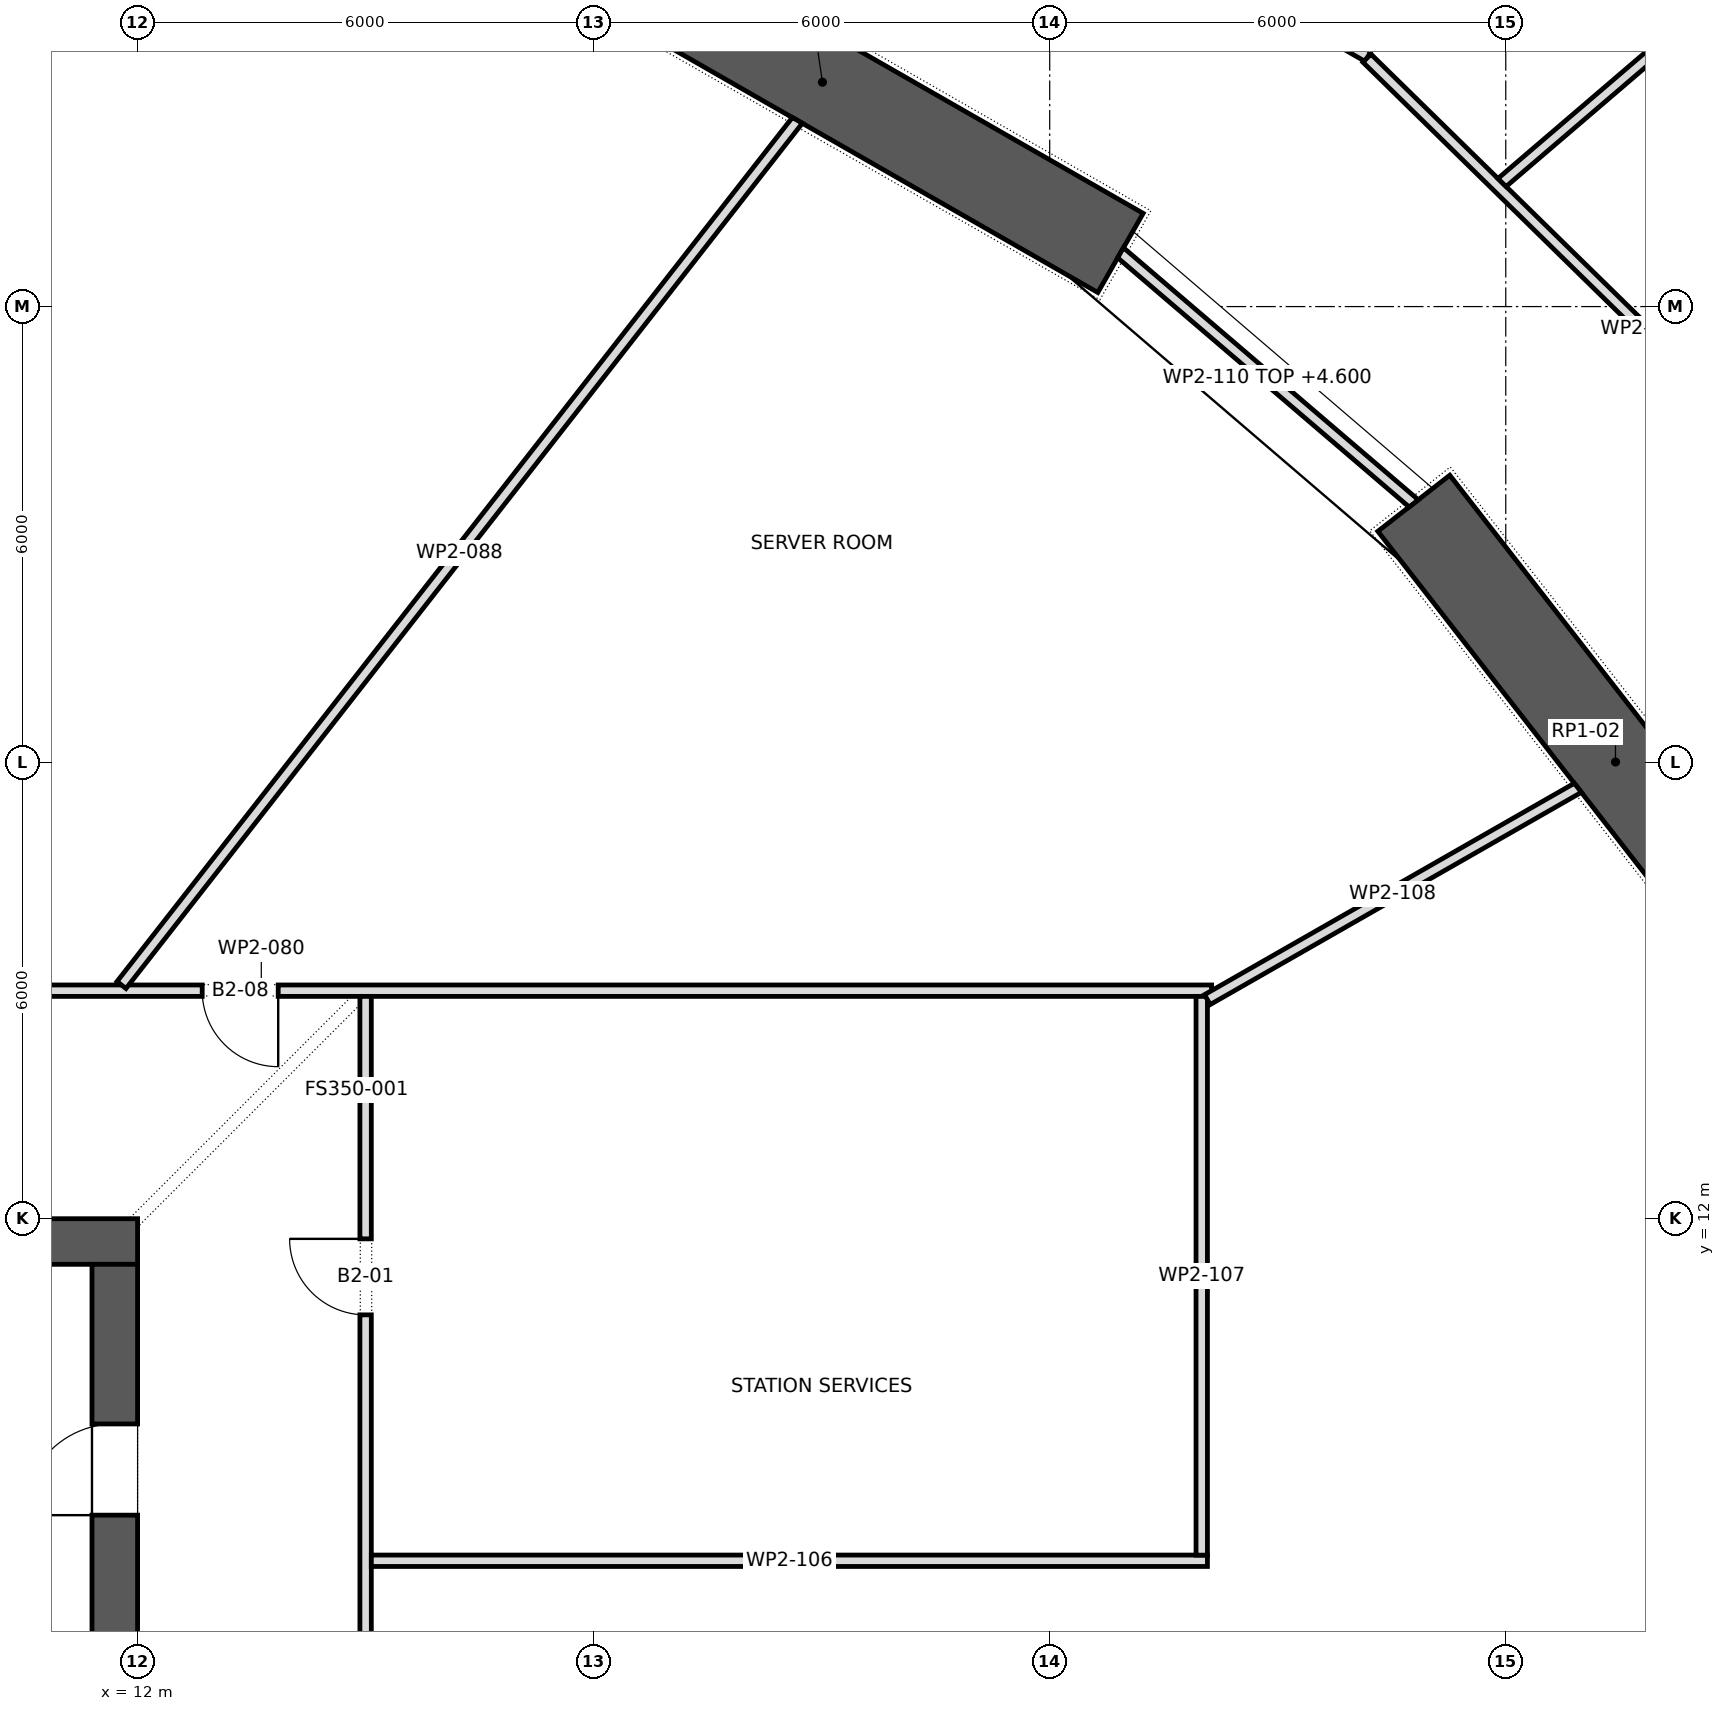
"""IFC4 building model, lengths in metres.
Left out: names, types, materials, properties, quantities, classifications, styles, units other than length and angle.
Written with IfcOpenShell. Run it as: python <this file> out.ifc"""

import sys

from ifc_helpers import new_model, si_unit, direction, frame, frame_2d, origin, place, context, subcontext, project, spatial, polyline, rectangle, outline, extrude, element, fill, save


model = new_model("IFC4")
c1 = context("Model", 3, precision=1e-05, world=origin(), true_north=direction((0.0, 1.0)))
c2 = subcontext(c1, "Body", "Model", "MODEL_VIEW")
j1 = project(units=[si_unit("LENGTHUNIT", "METRE"), si_unit("PLANEANGLEUNIT", "RADIAN")], contexts=[c1])
p1 = place(None, origin())
s1 = spatial("IfcSite", under=j1, at=p1, CompositionType="ELEMENT")
p2 = place(p1, origin())
s2 = spatial("IfcBuilding", under=s1, at=p2, CompositionType="ELEMENT")
p3 = place(p2, frame((0.0, 0.0, -9.5)))
s3 = spatial("IfcBuildingStorey", under=s2, at=p3, CompositionType="ELEMENT", Elevation=-9.5)
p4 = place(p3, frame((34.097, 14.605, 0.0), z_axis=(0.0, 0.0, 1.0), x_axis=(-0.614825322247, 0.788663314174, 0.0)))
e1 = element("IfcWall", 1, at=p4, inside=s3, PredefinedType="SHEAR", context=c2, shape_type="SweptSolid", body=[
    extrude(rectangle(XDim=8.632, YDim=1.2, at=frame_2d((4.316, 0.0))), origin(), (0.0, 0.0, 1.0), 5.5),
])
p5 = place(p3, frame((24.931, 24.706, 0.0), z_axis=(0.0, 0.0, 1.0), x_axis=(-0.867760656864, 0.496982336103, 0.0)))
e2 = element("IfcWall", 2, at=p5, inside=s3, PredefinedType="SHEAR", context=c2, shape_type="SweptSolid", body=[
    extrude(rectangle(XDim=9.038, YDim=1.2, at=frame_2d((4.519, 0.0))), origin(), (0.0, 0.0, 1.0), 5.5),
])
p6 = place(p3, frame((-12.0, 11.7, 0.0), z_axis=(0.0, 0.0, 1.0), x_axis=(1.0, 0.0, 0.0)))
e3 = element("IfcWall", 3, at=p6, inside=s3, PredefinedType="SHEAR", context=c2, shape_type="SweptSolid", body=[
    extrude(rectangle(XDim=24.0, YDim=0.6, at=frame_2d((12.0, 0.0))), origin(), (0.0, 0.0, 1.0), 5.5),
])
p7 = place(p6, frame((11.6, 0.0, 0.0)))
e4 = element("IfcOpeningElement", 4, at=p7, cuts=e3, PredefinedType="OPENING", context=c2, shape_type="SweptSolid", body=[
    extrude(rectangle(XDim=0.8, YDim=2.1, at=frame_2d((0.4, 1.05))), frame((0.0, 0.312, 0.0), z_axis=(0.0, -1.0, 0.0), x_axis=(1.0, 0.0, 0.0)), (0.0, 0.0, 1.0), 0.624),
])
p8 = place(p3, frame((11.7, -11.4, 0.0), z_axis=(0.0, 0.0, 1.0), x_axis=(0.0, 1.0, 0.0)))
e5 = element("IfcWall", 5, at=p8, inside=s3, PredefinedType="SHEAR", context=c2, shape_type="SweptSolid", body=[
    extrude(rectangle(XDim=22.8, YDim=0.6, at=frame_2d((11.4, 0.0))), origin(), (0.0, 0.0, 1.0), 5.5),
])
p9 = place(p8, frame((10.2, 0.0, 0.0)))
e6 = element("IfcOpeningElement", 6, at=p9, cuts=e5, PredefinedType="OPENING", context=c2, shape_type="SweptSolid", body=[
    extrude(rectangle(XDim=2.4, YDim=2.1, at=frame_2d((1.2, 1.05))), frame((0.0, 0.312, 0.0), z_axis=(0.0, -1.0, 0.0), x_axis=(1.0, 0.0, 0.0)), (0.0, 0.0, 1.0), 0.624),
])
p10 = place(p8, frame((19.5, 0.0, 0.0)))
e7 = element("IfcOpeningElement", 7, at=p10, cuts=e5, PredefinedType="OPENING", context=c2, shape_type="SweptSolid", body=[
    extrude(rectangle(XDim=1.2, YDim=2.1, at=frame_2d((0.6, 1.05))), frame((0.0, 0.312, 0.0), z_axis=(0.0, -1.0, 0.0), x_axis=(1.0, 0.0, 0.0)), (0.0, 0.0, 1.0), 0.624),
])
p11 = place(p8, frame((2.1, 0.0, 0.0)))
e8 = element("IfcOpeningElement", 8, at=p11, cuts=e5, PredefinedType="OPENING", context=c2, shape_type="SweptSolid", body=[
    extrude(rectangle(XDim=1.2, YDim=2.1, at=frame_2d((0.6, 1.05))), frame((0.0, 0.312, 0.0), z_axis=(0.0, -1.0, 0.0), x_axis=(1.0, 0.0, 0.0)), (0.0, 0.0, 1.0), 0.624),
])
p12 = place(p3, frame((1.125, 15.0, 0.0), z_axis=(0.0, 0.0, 1.0), x_axis=(1.0, 0.0, 0.0)))
e9 = element("IfcWall", 9, at=p12, inside=s3, PredefinedType="PARTITIONING", context=c2, shape_type="SweptSolid", body=[
    extrude(rectangle(XDim=25.005, YDim=0.15, at=frame_2d((12.502, 0.0))), origin(), (0.0, 0.0, 1.0), 5.05),
])
p13 = place(p12, frame((11.725, 0.0, 0.0)))
e10 = element("IfcOpeningElement", 10, at=p13, cuts=e9, PredefinedType="OPENING", context=c2, shape_type="SweptSolid", body=[
    extrude(rectangle(XDim=1.0, YDim=2.1, at=frame_2d((0.5, 1.05))), frame((0.0, 0.087, 0.0), z_axis=(0.0, -1.0, 0.0), x_axis=(1.0, 0.0, 0.0)), (0.0, 0.0, 1.0), 0.174),
])
p14 = place(p12, frame((4.444, 0.0, 0.0)))
e11 = element("IfcOpeningElement", 11, at=p14, cuts=e9, PredefinedType="OPENING", context=c2, shape_type="SweptSolid", body=[
    extrude(rectangle(XDim=1.8, YDim=2.1, at=frame_2d((0.9, 1.05))), frame((0.0, 0.087, 0.0), z_axis=(0.0, -1.0, 0.0), x_axis=(1.0, 0.0, 0.0)), (0.0, 0.0, 1.0), 0.174),
])
p15 = place(p3, frame((11.788, 15.074, 0.0), z_axis=(0.0, 0.0, 1.0), x_axis=(0.615848120598, 0.787864894735, 0.0)))
e12 = element("IfcWall", 12, at=p15, inside=s3, PredefinedType="PARTITIONING", context=c2, shape_type="SweptSolid", body=[
    extrude(outline(polyline([(0.0, -0.075), (14.449, -0.075), (14.428, 0.075), (0.0, 0.075), (0.0, -0.075)])), origin(), (0.0, 0.0, 1.0), 5.05),
])
p16 = place(p3, frame((15.0, -14.925, 0.0), z_axis=(0.0, 0.0, 1.0), x_axis=(0.0, 1.0, 0.0)))
e13 = element("IfcWall", 13, at=p16, inside=s3, PredefinedType="PARTITIONING", context=c2, shape_type="SweptSolid", body=[
    extrude(rectangle(XDim=29.85, YDim=0.15, at=frame_2d((14.925, 0.0))), origin(), (0.0, 0.0, 1.0), 5.05),
])
p17 = place(p16, frame((25.66, 0.0, 0.0)))
e14 = element("IfcOpeningElement", 14, at=p17, cuts=e13, PredefinedType="OPENING", context=c2, shape_type="SweptSolid", body=[
    extrude(rectangle(XDim=1.0, YDim=2.1, at=frame_2d((0.5, 1.05))), frame((0.0, 0.087, 0.0), z_axis=(0.0, -1.0, 0.0), x_axis=(1.0, 0.0, 0.0)), (0.0, 0.0, 1.0), 0.174),
])
p18 = place(p16, frame((3.19, 0.0, 0.0)))
e15 = element("IfcOpeningElement", 15, at=p18, cuts=e13, PredefinedType="OPENING", context=c2, shape_type="SweptSolid", body=[
    extrude(rectangle(XDim=1.0, YDim=2.1, at=frame_2d((0.5, 1.05))), frame((0.0, 0.087, 0.0), z_axis=(0.0, -1.0, 0.0), x_axis=(1.0, 0.0, 0.0)), (0.0, 0.0, 1.0), 0.174),
])
p19 = place(p16, frame((13.725, 0.0, 0.0)))
e16 = element("IfcOpeningElement", 16, at=p19, cuts=e13, PredefinedType="OPENING", context=c2, shape_type="SweptSolid", body=[
    extrude(rectangle(XDim=2.4, YDim=2.1, at=frame_2d((1.2, 1.05))), frame((0.0, 0.087, 0.0), z_axis=(0.0, -1.0, 0.0), x_axis=(1.0, 0.0, 0.0)), (0.0, 0.0, 1.0), 0.174),
])
p20 = place(p3, frame((18.948, 32.58, 0.0), z_axis=(0.0, 0.0, 1.0), x_axis=(0.867835024459, -0.496852463336, 0.0)))
e17 = element("IfcWall", 17, at=p20, inside=s3, PredefinedType="PARTITIONING", context=c2, shape_type="SweptSolid", body=[
    extrude(rectangle(XDim=10.647, YDim=0.15, at=frame_2d((5.323, 0.0))), origin(), (0.0, 0.0, 1.0), 5.05),
])
p21 = place(p20, frame((4.323, 0.0, 0.0)))
e18 = element("IfcOpeningElement", 18, at=p21, cuts=e17, PredefinedType="OPENING", context=c2, shape_type="SweptSolid", body=[
    extrude(rectangle(XDim=1.8, YDim=2.1, at=frame_2d((0.9, 1.05))), frame((0.0, 0.087, 0.0), z_axis=(0.0, -1.0, 0.0), x_axis=(1.0, 0.0, 0.0)), (0.0, 0.0, 1.0), 0.174),
])
p22 = place(p3, frame((26.075, 7.5, 0.0), z_axis=(0.0, 0.0, 1.0), x_axis=(-1.0, 0.0, 0.0)))
e19 = element("IfcWall", 19, at=p22, inside=s3, PredefinedType="PARTITIONING", context=c2, shape_type="SweptSolid", body=[
    extrude(rectangle(XDim=11.0, YDim=0.15, at=frame_2d((5.5, 0.0))), origin(), (0.0, 0.0, 1.0), 5.05),
])
p23 = place(p3, frame((26.0, 7.574, 0.0), z_axis=(0.0, 0.0, 1.0), x_axis=(0.0, 1.0, 0.0)))
e20 = element("IfcWall", 20, at=p23, inside=s3, PredefinedType="PARTITIONING", context=c2, shape_type="SweptSolid", body=[
    extrude(rectangle(XDim=7.351, YDim=0.15, at=frame_2d((3.676, 0.0))), origin(), (0.0, 0.0, 1.0), 5.05),
])
p24 = place(p3, frame((26.074, 14.882, 0.0), z_axis=(0.0, 0.0, 1.0), x_axis=(0.868133416031, 0.496330909746, 0.0)))
e21 = element("IfcWall", 21, at=p24, inside=s3, PredefinedType="PARTITIONING", context=c2, shape_type="SweptSolid", body=[
    extrude(outline(polyline([(0.0, -0.075), (5.626, -0.075), (5.604, 0.075), (0.0, 0.075), (0.0, -0.075)])), origin(), (0.0, 0.0, 1.0), 5.05),
])
p25 = place(p3, frame((28.174, 27.268, 0.0), z_axis=(0.0, 0.0, 1.0), x_axis=(0.714427427428, -0.699709547554, 0.0)))
e22 = element("IfcWall", 22, at=p25, inside=s3, PredefinedType="PARTITIONING", context=c2, shape_type="SweptSolid", body=[
    extrude(rectangle(XDim=10.202, YDim=0.15, at=frame_2d((5.101, 0.0))), origin(), (0.0, 0.0, 1.0), 5.05),
])
p26 = place(p25, frame((5.74, 0.0, 0.0)))
e23 = element("IfcOpeningElement", 23, at=p26, cuts=e22, PredefinedType="OPENING", context=c2, shape_type="SweptSolid", body=[
    extrude(rectangle(XDim=1.0, YDim=2.1, at=frame_2d((0.5, 1.05))), frame((0.0, 0.087, 0.0), z_axis=(0.0, -1.0, 0.0), x_axis=(1.0, 0.0, 0.0)), (0.0, 0.0, 1.0), 0.174),
])
p27 = place(p3, frame((28.789, 21.411, 0.0), z_axis=(0.0, 0.0, 1.0), x_axis=(-0.760084552743, 0.649824185978, 0.0)))
e24 = element("IfcWall", 24, at=p27, inside=s3, PredefinedType="PARTITIONING", context=c2, shape_type="SweptSolid", body=[
    extrude(outline(polyline([(-0.015, -0.075), (5.089, -0.075), (5.061, 0.075), (0.015, 0.075), (-0.015, -0.075)])), origin(), (0.0, 0.0, 1.0), 4.6),
])
p28 = place(p3, frame((29.95, 25.632, 0.0), z_axis=(0.0, 0.0, 1.0), x_axis=(0.759739094859, 0.650228042876, 0.0)))
e25 = element("IfcWall", 25, at=p28, inside=s3, PredefinedType="PARTITIONING", context=c2, shape_type="SweptSolid", body=[
    extrude(outline(polyline([(0.007, -0.075), (9.901, -0.075), (9.878, 0.075), (-0.007, 0.075), (0.007, -0.075)])), origin(), (0.0, 0.0, 1.0), 5.05),
])
p29 = place(p10, origin())
e26 = element("IfcDoor", 26, at=p29, inside=s3, OperationType="SINGLE_SWING_RIGHT", PredefinedType="DOOR", context=c2, shape_type="SweptSolid", body=[
    extrude(rectangle(XDim=1.2, YDim=2.1, at=frame_2d((0.6, 1.05))), frame((0.0, 0.025, 0.0), z_axis=(0.0, -1.0, 0.0), x_axis=(1.0, 0.0, 0.0)), (0.0, 0.0, 1.0), 0.05),
])
fill(e7, e26)
p30 = place(p17, origin())
e27 = element("IfcDoor", 27, at=p30, inside=s3, OperationType="SINGLE_SWING_LEFT", PredefinedType="DOOR", context=c2, shape_type="SweptSolid", body=[
    extrude(rectangle(XDim=1.0, YDim=2.1, at=frame_2d((0.5, 1.05))), frame((0.0, 0.025, 0.0), z_axis=(0.0, -1.0, 0.0), x_axis=(1.0, 0.0, 0.0)), (0.0, 0.0, 1.0), 0.05),
])
fill(e14, e27)
p31 = place(p13, frame((1.0, 0.0, 0.0), z_axis=(0.0, 0.0, 1.0), x_axis=(-1.0, 0.0, 0.0)))
e28 = element("IfcDoor", 28, at=p31, inside=s3, OperationType="SINGLE_SWING_RIGHT", PredefinedType="DOOR", context=c2, shape_type="SweptSolid", body=[
    extrude(rectangle(XDim=1.0, YDim=2.1, at=frame_2d((0.5, 1.05))), frame((0.0, 0.025, 0.0), z_axis=(0.0, -1.0, 0.0), x_axis=(1.0, 0.0, 0.0)), (0.0, 0.0, 1.0), 0.05),
])
fill(e10, e28)
save(model, sys.argv[1])
